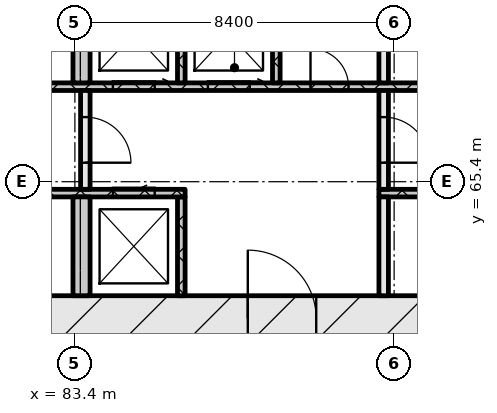
"""IFC4 building model, lengths in metres.
Left out: names, types, materials, properties, quantities, classifications, styles, units other than length and angle.
Written with IfcOpenShell. Run it as: python <this file> out.ifc"""

import sys

from ifc_helpers import new_model, si_unit, direction, frame, frame_2d, origin, place, context, subcontext, project, spatial, rectangle, extrude, element, fill, save


model = new_model("IFC4")
c1 = context("Model", 3, precision=1e-05, world=origin(), true_north=direction((0.0, 1.0)))
c2 = subcontext(c1, "Body", "Model", "MODEL_VIEW")
j1 = project(units=[si_unit("LENGTHUNIT", "METRE"), si_unit("PLANEANGLEUNIT", "RADIAN")], contexts=[c1])
p1 = place(None, origin())
s1 = spatial("IfcSite", under=j1, at=p1, CompositionType="ELEMENT")
p2 = place(p1, origin())
s2 = spatial("IfcBuilding", under=s1, at=p2, CompositionType="ELEMENT")
p3 = place(p2, frame((0.0, 0.0, 9.0)))
s3 = spatial("IfcBuildingStorey", under=s2, at=p3, CompositionType="ELEMENT", Elevation=9.0)
p4 = place(p3, frame((66.6, 61.8, 0.0), z_axis=(0.0, 0.0, 1.0), x_axis=(1.0, 0.0, 0.0)))
e1 = element("IfcWall", 1, at=p4, inside=s3, PredefinedType="SOLIDWALL", context=c2, shape_type="SweptSolid", body=[
    extrude(rectangle(XDim=42.0, YDim=1.2, at=frame_2d((21.0, 0.0))), origin(), (0.0, 0.0, 1.0), 5.1),
])
p5 = place(p4, frame((21.35, 0.0, 0.0)))
e2 = element("IfcOpeningElement", 2, at=p5, cuts=e1, PredefinedType="OPENING", context=c2, shape_type="SweptSolid", body=[
    extrude(rectangle(XDim=1.8, YDim=2.1, at=frame_2d((0.9, 1.05))), frame((0.0, 0.61, 0.0), z_axis=(0.0, -1.0, 0.0), x_axis=(1.0, 0.0, 0.0)), (0.0, 0.0, 1.0), 1.22),
])
p6 = place(p3, frame((83.575, 62.4, 0.0), z_axis=(0.0, 0.0, 1.0), x_axis=(0.0, 1.0, 0.0)))
e3 = element("IfcWall", 3, at=p6, inside=s3, PredefinedType="SOLIDWALL", context=c2, shape_type="SweptSolid", body=[
    extrude(rectangle(XDim=2.6, YDim=0.45, at=frame_2d((1.3, 0.0))), origin(), (0.0, 0.0, 1.0), 5.1),
])
p7 = place(p3, frame((86.2, 62.4, 0.0), z_axis=(0.0, 0.0, 1.0), x_axis=(0.0, 1.0, 0.0)))
e4 = element("IfcWall", 4, at=p7, inside=s3, PredefinedType="SOLIDWALL", context=c2, shape_type="SweptSolid", body=[
    extrude(rectangle(XDim=2.6, YDim=0.2, at=frame_2d((1.3, 0.0))), origin(), (0.0, 0.0, 1.0), 5.1),
])
p8 = place(p3, frame((91.525, 62.4, 0.0), z_axis=(0.0, 0.0, 1.0), x_axis=(0.0, 1.0, 0.0)))
e5 = element("IfcWall", 5, at=p8, inside=s3, PredefinedType="SOLIDWALL", context=c2, shape_type="SweptSolid", body=[
    extrude(rectangle(XDim=2.6, YDim=0.25, at=frame_2d((1.3, 0.0))), origin(), (0.0, 0.0, 1.0), 5.1),
])
p9 = place(p3, frame((67.8, 65.1, 0.0), z_axis=(0.0, 0.0, 1.0), x_axis=(1.0, 0.0, 0.0)))
e6 = element("IfcWall", 6, at=p9, inside=s3, PredefinedType="SOLIDWALL", context=c2, shape_type="SweptSolid", body=[
    extrude(rectangle(XDim=18.5, YDim=0.2, at=frame_2d((9.25, 0.0))), origin(), (0.0, 0.0, 1.0), 5.1),
])
p10 = place(p9, frame((7.27, 0.0, 0.0)))
e7 = element("IfcOpeningElement", 7, at=p10, cuts=e6, PredefinedType="OPENING", context=c2, shape_type="SweptSolid", body=[
    extrude(rectangle(XDim=0.9, YDim=2.1, at=frame_2d((0.45, 1.05))), frame((0.0, 0.11, 0.0), z_axis=(0.0, -1.0, 0.0), x_axis=(1.0, 0.0, 0.0)), (0.0, 0.0, 1.0), 0.22),
])
p11 = place(p9, frame((16.6, 0.0, 0.0)))
e8 = element("IfcOpeningElement", 8, at=p11, cuts=e6, PredefinedType="OPENING", context=c2, shape_type="SweptSolid", body=[
    extrude(rectangle(XDim=1.1, YDim=2.1, at=frame_2d((0.55, 1.05))), frame((0.0, 0.11, 0.0), z_axis=(0.0, -1.0, 0.0), x_axis=(1.0, 0.0, 0.0)), (0.0, 0.0, 1.0), 0.22),
])
p12 = place(p3, frame((91.4, 65.1, 0.0), z_axis=(0.0, 0.0, 1.0), x_axis=(1.0, 0.0, 0.0)))
e9 = element("IfcWall", 9, at=p12, inside=s3, PredefinedType="SOLIDWALL", context=c2, shape_type="SweptSolid", body=[
    extrude(rectangle(XDim=16.0, YDim=0.2, at=frame_2d((8.0, 0.0))), origin(), (0.0, 0.0, 1.0), 5.1),
])
p13 = place(p12, frame((7.83, 0.0, 0.0)))
e10 = element("IfcOpeningElement", 10, at=p13, cuts=e9, PredefinedType="OPENING", context=c2, shape_type="SweptSolid", body=[
    extrude(rectangle(XDim=0.9, YDim=2.1, at=frame_2d((0.45, 1.05))), frame((0.0, 0.11, 0.0), z_axis=(0.0, -1.0, 0.0), x_axis=(1.0, 0.0, 0.0)), (0.0, 0.0, 1.0), 0.22),
])
p14 = place(p3, frame((83.675, 65.2, 0.0), z_axis=(0.0, 0.0, 1.0), x_axis=(0.0, 1.0, 0.0)))
e11 = element("IfcWall", 11, at=p14, inside=s3, PredefinedType="SOLIDWALL", context=c2, shape_type="SweptSolid", body=[
    extrude(rectangle(XDim=2.6, YDim=0.25, at=frame_2d((1.3, 0.0))), origin(), (0.0, 0.0, 1.0), 5.1),
])
p15 = place(p14, frame((0.7, 0.0, 0.0)))
e12 = element("IfcOpeningElement", 12, at=p15, cuts=e11, PredefinedType="OPENING", context=c2, shape_type="SweptSolid", body=[
    extrude(rectangle(XDim=1.2, YDim=2.1, at=frame_2d((0.6, 1.05))), frame((0.0, 0.135, 0.0), z_axis=(0.0, -1.0, 0.0), x_axis=(1.0, 0.0, 0.0)), (0.0, 0.0, 1.0), 0.27),
])
p16 = place(p3, frame((91.525, 65.2, 0.0), z_axis=(0.0, 0.0, 1.0), x_axis=(0.0, 1.0, 0.0)))
e13 = element("IfcWall", 13, at=p16, inside=s3, PredefinedType="SOLIDWALL", context=c2, shape_type="SweptSolid", body=[
    extrude(rectangle(XDim=2.6, YDim=0.25, at=frame_2d((1.3, 0.0))), origin(), (0.0, 0.0, 1.0), 5.1),
])
p17 = place(p16, frame((0.7, 0.0, 0.0)))
e14 = element("IfcOpeningElement", 14, at=p17, cuts=e13, PredefinedType="OPENING", context=c2, shape_type="SweptSolid", body=[
    extrude(rectangle(XDim=1.2, YDim=2.1, at=frame_2d((0.6, 1.05))), frame((0.0, 0.135, 0.0), z_axis=(0.0, -1.0, 0.0), x_axis=(1.0, 0.0, 0.0)), (0.0, 0.0, 1.0), 0.27),
])
p18 = place(p3, frame((76.05, 67.9, 0.0), z_axis=(0.0, 0.0, 1.0), x_axis=(1.0, 0.0, 0.0)))
e15 = element("IfcWall", 15, at=p18, inside=s3, PredefinedType="SOLIDWALL", context=c2, shape_type="SweptSolid", body=[
    extrude(rectangle(XDim=23.1, YDim=0.2, at=frame_2d((11.55, 0.0))), origin(), (0.0, 0.0, 1.0), 5.1),
])
p19 = place(p18, frame((8.35, 0.0, 0.0)))
e16 = element("IfcOpeningElement", 16, at=p19, cuts=e15, PredefinedType="OPENING", context=c2, shape_type="SweptSolid", body=[
    extrude(rectangle(XDim=1.1, YDim=2.1, at=frame_2d((0.55, 1.05))), frame((0.0, 0.11, 0.0), z_axis=(0.0, -1.0, 0.0), x_axis=(1.0, 0.0, 0.0)), (0.0, 0.0, 1.0), 0.22),
])
p20 = place(p18, frame((10.85, 0.0, 0.0)))
e17 = element("IfcOpeningElement", 17, at=p20, cuts=e15, PredefinedType="OPENING", context=c2, shape_type="SweptSolid", body=[
    extrude(rectangle(XDim=1.1, YDim=2.1, at=frame_2d((0.55, 1.05))), frame((0.0, 0.11, 0.0), z_axis=(0.0, -1.0, 0.0), x_axis=(1.0, 0.0, 0.0)), (0.0, 0.0, 1.0), 0.22),
])
p21 = place(p18, frame((13.55, 0.0, 0.0)))
e18 = element("IfcOpeningElement", 18, at=p21, cuts=e15, PredefinedType="OPENING", context=c2, shape_type="SweptSolid", body=[
    extrude(rectangle(XDim=1.0, YDim=2.1, at=frame_2d((0.5, 1.05))), frame((0.0, 0.11, 0.0), z_axis=(0.0, -1.0, 0.0), x_axis=(1.0, 0.0, 0.0)), (0.0, 0.0, 1.0), 0.22),
])
p22 = place(p3, frame((83.575, 68.0, 0.0), z_axis=(0.0, 0.0, 1.0), x_axis=(0.0, 1.0, 0.0)))
e19 = element("IfcWall", 19, at=p22, inside=s3, PredefinedType="SOLIDWALL", context=c2, shape_type="SweptSolid", body=[
    extrude(rectangle(XDim=2.6, YDim=0.45, at=frame_2d((1.3, 0.0))), origin(), (0.0, 0.0, 1.0), 5.1),
])
for number, where, z_axis, x_axis in (
    (20, (86.2, 68.0, 0.0), (0.0, 0.0, 1.0), (0.0, 1.0, 0.0)),
    (21, (88.7, 68.0, 0.0), (0.0, 0.0, 1.0), (0.0, 1.0, 0.0)),
):
    element("IfcWall", number, at=place(p3, frame(where, z_axis=z_axis, x_axis=x_axis)), inside=s3, PredefinedType="SOLIDWALL", context=c2, shape_type="SweptSolid", body=[
        extrude(rectangle(XDim=2.6, YDim=0.2, at=frame_2d((1.3, 0.0))), origin(), (0.0, 0.0, 1.0), 5.1),
    ])
p23 = place(p3, frame((91.525, 68.0, 0.0), z_axis=(0.0, 0.0, 1.0), x_axis=(0.0, 1.0, 0.0)))
e22 = element("IfcWall", 22, at=p23, inside=s3, PredefinedType="SOLIDWALL", context=c2, shape_type="SweptSolid", body=[
    extrude(rectangle(XDim=2.6, YDim=0.25, at=frame_2d((1.3, 0.0))), origin(), (0.0, 0.0, 1.0), 5.1),
])
p24 = place(p5, origin())
e23 = element("IfcDoor", 23, at=p24, inside=s3, OperationType="DOUBLE_DOOR_SINGLE_SWING", PredefinedType="DOOR", context=c2, shape_type="SweptSolid", body=[
    extrude(rectangle(XDim=1.8, YDim=2.1, at=frame_2d((0.9, 1.05))), frame((0.0, 0.025, 0.0), z_axis=(0.0, -1.0, 0.0), x_axis=(1.0, 0.0, 0.0)), (0.0, 0.0, 1.0), 0.05),
])
fill(e2, e23)
p25 = place(p11, origin())
e24 = element("IfcDoor", 24, at=p25, inside=s3, OperationType="SLIDING_TO_LEFT", PredefinedType="DOOR", context=c2, shape_type="SweptSolid", body=[
    extrude(rectangle(XDim=1.1, YDim=2.1, at=frame_2d((0.55, 1.05))), frame((0.0, 0.025, 0.0), z_axis=(0.0, -1.0, 0.0), x_axis=(1.0, 0.0, 0.0)), (0.0, 0.0, 1.0), 0.05),
])
fill(e8, e24)
p26 = place(p15, origin())
e25 = element("IfcDoor", 25, at=p26, inside=s3, OperationType="SINGLE_SWING_RIGHT", PredefinedType="DOOR", context=c2, shape_type="SweptSolid", body=[
    extrude(rectangle(XDim=1.2, YDim=2.1, at=frame_2d((0.6, 1.05))), frame((0.0, 0.025, 0.0), z_axis=(0.0, -1.0, 0.0), x_axis=(1.0, 0.0, 0.0)), (0.0, 0.0, 1.0), 0.05),
])
fill(e12, e25)
p27 = place(p17, origin())
e26 = element("IfcDoor", 26, at=p27, inside=s3, OperationType="SINGLE_SWING_RIGHT", PredefinedType="DOOR", context=c2, shape_type="SweptSolid", body=[
    extrude(rectangle(XDim=1.2, YDim=2.1, at=frame_2d((0.6, 1.05))), frame((0.0, 0.025, 0.0), z_axis=(0.0, -1.0, 0.0), x_axis=(1.0, 0.0, 0.0)), (0.0, 0.0, 1.0), 0.05),
])
fill(e14, e26)
p28 = place(p19, origin())
e27 = element("IfcDoor", 27, at=p28, inside=s3, OperationType="SLIDING_TO_RIGHT", PredefinedType="DOOR", context=c2, shape_type="SweptSolid", body=[
    extrude(rectangle(XDim=1.1, YDim=2.1, at=frame_2d((0.55, 1.05))), frame((0.0, 0.025, 0.0), z_axis=(0.0, -1.0, 0.0), x_axis=(1.0, 0.0, 0.0)), (0.0, 0.0, 1.0), 0.05),
])
fill(e16, e27)
p29 = place(p20, origin())
e28 = element("IfcDoor", 28, at=p29, inside=s3, OperationType="SLIDING_TO_RIGHT", PredefinedType="DOOR", context=c2, shape_type="SweptSolid", body=[
    extrude(rectangle(XDim=1.1, YDim=2.1, at=frame_2d((0.55, 1.05))), frame((0.0, 0.025, 0.0), z_axis=(0.0, -1.0, 0.0), x_axis=(1.0, 0.0, 0.0)), (0.0, 0.0, 1.0), 0.05),
])
fill(e17, e28)
p30 = place(p21, origin())
e29 = element("IfcDoor", 29, at=p30, inside=s3, OperationType="SINGLE_SWING_LEFT", PredefinedType="DOOR", context=c2, shape_type="SweptSolid", body=[
    extrude(rectangle(XDim=1.0, YDim=2.1, at=frame_2d((0.5, 1.05))), frame((0.0, 0.025, 0.0), z_axis=(0.0, -1.0, 0.0), x_axis=(1.0, 0.0, 0.0)), (0.0, 0.0, 1.0), 0.05),
])
fill(e18, e29)
save(model, sys.argv[1])
